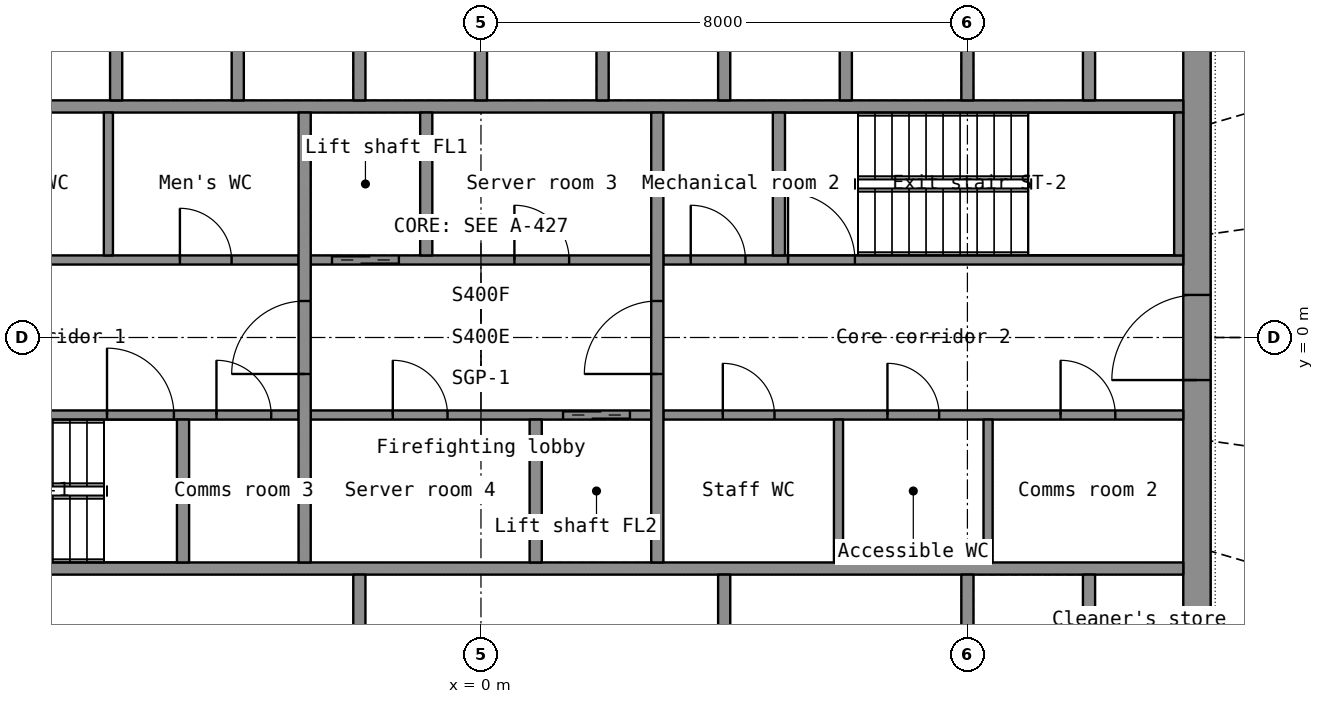
"""IFC4 building model, lengths in metres.
Left out: names, types, materials, properties, quantities, classifications, styles, units other than length and angle.
Written with IfcOpenShell. Run it as: python <this file> out.ifc"""

import sys

from ifc_helpers import new_model, si_unit, direction, frame, frame_2d, origin, place, context, subcontext, project, spatial, rectangle, extrude, element, fill, save


model = new_model("IFC4")
c1 = context("Model", 3, precision=1e-05, world=origin(), true_north=direction((0.0, 1.0)))
c2 = subcontext(c1, "Body", "Model", "MODEL_VIEW")
j1 = project(units=[si_unit("LENGTHUNIT", "METRE"), si_unit("PLANEANGLEUNIT", "RADIAN")], contexts=[c1])
p1 = place(None, origin())
s1 = spatial("IfcSite", under=j1, at=p1, CompositionType="ELEMENT")
p2 = place(p1, origin())
s2 = spatial("IfcBuilding", under=s1, at=p2, CompositionType="ELEMENT")
p3 = place(p2, frame((0.0, 0.0, 205.2)))
s3 = spatial("IfcBuildingStorey", under=s2, at=p3, CompositionType="ELEMENT", Elevation=205.2)
p4 = place(p3, frame((11.775, -7.2, 0.0), z_axis=(0.0, 0.0, 1.0), x_axis=(0.0, 1.0, 0.0)))
e1 = element("IfcWall", 1, at=p4, inside=s3, PredefinedType="SHEAR", context=c2, shape_type="SweptSolid", body=[
    extrude(rectangle(XDim=14.4, YDim=0.45, at=frame_2d((7.2, 0.0))), origin(), (0.0, 0.0, 1.0), 7.0),
])
p5 = place(p4, frame((6.5, 0.0, 0.0)))
e2 = element("IfcOpeningElement", 2, at=p5, cuts=e1, PredefinedType="OPENING", context=c2, shape_type="SweptSolid", body=[
    extrude(rectangle(XDim=1.4, YDim=2.2, at=frame_2d((0.7, 1.1))), frame((0.0, 0.235, 0.0), z_axis=(0.0, -1.0, 0.0), x_axis=(1.0, 0.0, 0.0)), (0.0, 0.0, 1.0), 0.47),
])
for number, where, z_axis, x_axis in (
    (3, (-11.55, -3.8, 0.0), (0.0, 0.0, 1.0), (1.0, 0.0, 0.0)),
    (4, (-11.55, 3.8, 0.0), (0.0, 0.0, 1.0), (1.0, 0.0, 0.0)),
):
    element("IfcWall", number, at=place(p3, frame(where, z_axis=z_axis, x_axis=x_axis)), inside=s3, PredefinedType="SHEAR", context=c2, shape_type="SweptSolid", body=[
        extrude(rectangle(XDim=23.1, YDim=0.2, at=frame_2d((11.55, 0.0))), origin(), (0.0, 0.0, 1.0), 7.0),
    ])
for number, where, z_axis, x_axis in (
    (5, (8.0, -6.75, 0.0), (0.0, 0.0, 1.0), (0.0, 1.0, 0.0)),
    (6, (10.0, -6.75, 0.0), (0.0, 0.0, 1.0), (0.0, 1.0, 0.0)),
):
    element("IfcWall", number, at=place(p3, frame(where, z_axis=z_axis, x_axis=x_axis)), inside=s3, PredefinedType="SHEAR", context=c2, shape_type="SweptSolid", body=[
        extrude(rectangle(XDim=2.85, YDim=0.2, at=frame_2d((1.425, 0.0))), origin(), (0.0, 0.0, 1.0), 7.0),
    ])
for number, where, z_axis, x_axis in (
    (7, (-2.0, -6.75, 0.0), (0.0, 0.0, 1.0), (0.0, 1.0, 0.0)),
    (8, (4.0, -6.75, 0.0), (0.0, 0.0, 1.0), (0.0, 1.0, 0.0)),
):
    element("IfcWall", number, at=place(p3, frame(where, z_axis=z_axis, x_axis=x_axis)), inside=s3, PredefinedType="PARTITIONING", context=c2, shape_type="SweptSolid", body=[
        extrude(rectangle(XDim=2.85, YDim=0.2, at=frame_2d((1.425, 0.0))), origin(), (0.0, 0.0, 1.0), 7.0),
    ])
for number, where, z_axis, x_axis in (
    (9, (-6.0, 3.9, 0.0), (0.0, 0.0, 1.0), (0.0, 1.0, 0.0)),
    (10, (-4.0, 3.9, 0.0), (0.0, 0.0, 1.0), (0.0, 1.0, 0.0)),
    (11, (-2.0, 3.9, 0.0), (0.0, 0.0, 1.0), (0.0, 1.0, 0.0)),
    (12, (0.0, 3.9, 0.0), (0.0, 0.0, 1.0), (0.0, 1.0, 0.0)),
    (13, (2.0, 3.9, 0.0), (0.0, 0.0, 1.0), (0.0, 1.0, 0.0)),
    (14, (4.0, 3.9, 0.0), (0.0, 0.0, 1.0), (0.0, 1.0, 0.0)),
    (15, (6.0, 3.9, 0.0), (0.0, 0.0, 1.0), (0.0, 1.0, 0.0)),
    (16, (8.0, 3.9, 0.0), (0.0, 0.0, 1.0), (0.0, 1.0, 0.0)),
    (17, (10.0, 3.9, 0.0), (0.0, 0.0, 1.0), (0.0, 1.0, 0.0)),
):
    element("IfcWall", number, at=place(p3, frame(where, z_axis=z_axis, x_axis=x_axis)), inside=s3, PredefinedType="SHEAR", context=c2, shape_type="SweptSolid", body=[
        extrude(rectangle(XDim=2.85, YDim=0.2, at=frame_2d((1.425, 0.0))), origin(), (0.0, 0.0, 1.0), 7.0),
    ])
p6 = place(p3, frame((-11.55, -1.275, 0.0), z_axis=(0.0, 0.0, 1.0), x_axis=(1.0, 0.0, 0.0)))
e18 = element("IfcWall", 18, at=p6, inside=s3, PredefinedType="SHEAR", context=c2, shape_type="SweptSolid", body=[
    extrude(rectangle(XDim=8.55, YDim=0.15, at=frame_2d((4.275, 0.0))), origin(), (0.0, 0.0, 1.0), 7.0),
])
p7 = place(p6, frame((5.4, 0.0, 0.0)))
e19 = element("IfcOpeningElement", 19, at=p7, cuts=e18, PredefinedType="OPENING", context=c2, shape_type="SweptSolid", body=[
    extrude(rectangle(XDim=1.1, YDim=2.15, at=frame_2d((0.55, 1.075))), frame((0.0, 0.085, 0.0), z_axis=(0.0, -1.0, 0.0), x_axis=(1.0, 0.0, 0.0)), (0.0, 0.0, 1.0), 0.17),
])
p8 = place(p6, frame((7.2, 0.0, 0.0)))
e20 = element("IfcOpeningElement", 20, at=p8, cuts=e18, PredefinedType="OPENING", context=c2, shape_type="SweptSolid", body=[
    extrude(rectangle(XDim=0.9, YDim=2.1, at=frame_2d((0.45, 1.05))), frame((0.0, 0.085, 0.0), z_axis=(0.0, -1.0, 0.0), x_axis=(1.0, 0.0, 0.0)), (0.0, 0.0, 1.0), 0.17),
])
p9 = place(p3, frame((-2.8, -1.275, 0.0), z_axis=(0.0, 0.0, 1.0), x_axis=(1.0, 0.0, 0.0)))
e21 = element("IfcWall", 21, at=p9, inside=s3, PredefinedType="SHEAR", context=c2, shape_type="SweptSolid", body=[
    extrude(rectangle(XDim=5.6, YDim=0.15, at=frame_2d((2.8, 0.0))), origin(), (0.0, 0.0, 1.0), 7.0),
])
p10 = place(p9, frame((4.15, 0.0, 0.0)))
e22 = element("IfcOpeningElement", 22, at=p10, cuts=e21, PredefinedType="OPENING", context=c2, shape_type="SweptSolid", body=[
    extrude(rectangle(XDim=1.1, YDim=2.2, at=frame_2d((0.55, 1.1))), frame((0.0, 0.085, 0.0), z_axis=(0.0, -1.0, 0.0), x_axis=(1.0, 0.0, 0.0)), (0.0, 0.0, 1.0), 0.17),
])
p11 = place(p9, frame((1.35, 0.0, 0.0)))
e23 = element("IfcOpeningElement", 23, at=p11, cuts=e21, PredefinedType="OPENING", context=c2, shape_type="SweptSolid", body=[
    extrude(rectangle(XDim=0.9, YDim=2.1, at=frame_2d((0.45, 1.05))), frame((0.0, 0.085, 0.0), z_axis=(0.0, -1.0, 0.0), x_axis=(1.0, 0.0, 0.0)), (0.0, 0.0, 1.0), 0.17),
])
p12 = place(p3, frame((3.0, -1.275, 0.0), z_axis=(0.0, 0.0, 1.0), x_axis=(1.0, 0.0, 0.0)))
e24 = element("IfcWall", 24, at=p12, inside=s3, PredefinedType="PARTITIONING", context=c2, shape_type="SweptSolid", body=[
    extrude(rectangle(XDim=8.55, YDim=0.15, at=frame_2d((4.275, 0.0))), origin(), (0.0, 0.0, 1.0), 7.0),
])
p13 = place(p12, frame((0.978, 0.0, 0.0)))
e25 = element("IfcOpeningElement", 25, at=p13, cuts=e24, PredefinedType="OPENING", context=c2, shape_type="SweptSolid", body=[
    extrude(rectangle(XDim=0.85, YDim=2.1, at=frame_2d((0.425, 1.05))), frame((0.0, 0.085, 0.0), z_axis=(0.0, -1.0, 0.0), x_axis=(1.0, 0.0, 0.0)), (0.0, 0.0, 1.0), 0.17),
])
p14 = place(p12, frame((3.685, 0.0, 0.0)))
e26 = element("IfcOpeningElement", 26, at=p14, cuts=e24, PredefinedType="OPENING", context=c2, shape_type="SweptSolid", body=[
    extrude(rectangle(XDim=0.85, YDim=2.1, at=frame_2d((0.425, 1.05))), frame((0.0, 0.085, 0.0), z_axis=(0.0, -1.0, 0.0), x_axis=(1.0, 0.0, 0.0)), (0.0, 0.0, 1.0), 0.17),
])
p15 = place(p12, frame((6.532, 0.0, 0.0)))
e27 = element("IfcOpeningElement", 27, at=p15, cuts=e24, PredefinedType="OPENING", context=c2, shape_type="SweptSolid", body=[
    extrude(rectangle(XDim=0.9, YDim=2.1, at=frame_2d((0.45, 1.05))), frame((0.0, 0.085, 0.0), z_axis=(0.0, -1.0, 0.0), x_axis=(1.0, 0.0, 0.0)), (0.0, 0.0, 1.0), 0.17),
])
p16 = place(p3, frame((-11.55, 1.275, 0.0), z_axis=(0.0, 0.0, 1.0), x_axis=(1.0, 0.0, 0.0)))
e28 = element("IfcWall", 28, at=p16, inside=s3, PredefinedType="PARTITIONING", context=c2, shape_type="SweptSolid", body=[
    extrude(rectangle(XDim=8.55, YDim=0.15, at=frame_2d((4.275, 0.0))), origin(), (0.0, 0.0, 1.0), 7.0),
])
p17 = place(p16, frame((0.623, 0.0, 0.0)))
e29 = element("IfcOpeningElement", 29, at=p17, cuts=e28, PredefinedType="OPENING", context=c2, shape_type="SweptSolid", body=[
    extrude(rectangle(XDim=0.9, YDim=2.1, at=frame_2d((0.45, 1.05))), frame((0.0, 0.085, 0.0), z_axis=(0.0, -1.0, 0.0), x_axis=(1.0, 0.0, 0.0)), (0.0, 0.0, 1.0), 0.17),
])
p18 = place(p16, frame((3.396, 0.0, 0.0)))
e30 = element("IfcOpeningElement", 30, at=p18, cuts=e28, PredefinedType="OPENING", context=c2, shape_type="SweptSolid", body=[
    extrude(rectangle(XDim=0.85, YDim=2.1, at=frame_2d((0.425, 1.05))), frame((0.0, 0.085, 0.0), z_axis=(0.0, -1.0, 0.0), x_axis=(1.0, 0.0, 0.0)), (0.0, 0.0, 1.0), 0.17),
])
p19 = place(p16, frame((6.599, 0.0, 0.0)))
e31 = element("IfcOpeningElement", 31, at=p19, cuts=e28, PredefinedType="OPENING", context=c2, shape_type="SweptSolid", body=[
    extrude(rectangle(XDim=0.85, YDim=2.1, at=frame_2d((0.425, 1.05))), frame((0.0, 0.085, 0.0), z_axis=(0.0, -1.0, 0.0), x_axis=(1.0, 0.0, 0.0)), (0.0, 0.0, 1.0), 0.17),
])
p20 = place(p3, frame((-2.8, 1.275, 0.0), z_axis=(0.0, 0.0, 1.0), x_axis=(1.0, 0.0, 0.0)))
e32 = element("IfcWall", 32, at=p20, inside=s3, PredefinedType="SHEAR", context=c2, shape_type="SweptSolid", body=[
    extrude(rectangle(XDim=5.6, YDim=0.15, at=frame_2d((2.8, 0.0))), origin(), (0.0, 0.0, 1.0), 7.0),
])
p21 = place(p20, frame((0.35, 0.0, 0.0)))
e33 = element("IfcOpeningElement", 33, at=p21, cuts=e32, PredefinedType="OPENING", context=c2, shape_type="SweptSolid", body=[
    extrude(rectangle(XDim=1.1, YDim=2.2, at=frame_2d((0.55, 1.1))), frame((0.0, 0.085, 0.0), z_axis=(0.0, -1.0, 0.0), x_axis=(1.0, 0.0, 0.0)), (0.0, 0.0, 1.0), 0.17),
])
p22 = place(p20, frame((3.35, 0.0, 0.0)))
e34 = element("IfcOpeningElement", 34, at=p22, cuts=e32, PredefinedType="OPENING", context=c2, shape_type="SweptSolid", body=[
    extrude(rectangle(XDim=0.9, YDim=2.1, at=frame_2d((0.45, 1.05))), frame((0.0, 0.085, 0.0), z_axis=(0.0, -1.0, 0.0), x_axis=(1.0, 0.0, 0.0)), (0.0, 0.0, 1.0), 0.17),
])
p23 = place(p3, frame((3.0, 1.275, 0.0), z_axis=(0.0, 0.0, 1.0), x_axis=(1.0, 0.0, 0.0)))
e35 = element("IfcWall", 35, at=p23, inside=s3, PredefinedType="SHEAR", context=c2, shape_type="SweptSolid", body=[
    extrude(rectangle(XDim=8.55, YDim=0.15, at=frame_2d((4.275, 0.0))), origin(), (0.0, 0.0, 1.0), 7.0),
])
p24 = place(p23, frame((2.05, 0.0, 0.0)))
e36 = element("IfcOpeningElement", 36, at=p24, cuts=e35, PredefinedType="OPENING", context=c2, shape_type="SweptSolid", body=[
    extrude(rectangle(XDim=1.1, YDim=2.15, at=frame_2d((0.55, 1.075))), frame((0.0, 0.085, 0.0), z_axis=(0.0, -1.0, 0.0), x_axis=(1.0, 0.0, 0.0)), (0.0, 0.0, 1.0), 0.17),
])
p25 = place(p23, frame((0.45, 0.0, 0.0)))
e37 = element("IfcOpeningElement", 37, at=p25, cuts=e35, PredefinedType="OPENING", context=c2, shape_type="SweptSolid", body=[
    extrude(rectangle(XDim=0.9, YDim=2.1, at=frame_2d((0.45, 1.05))), frame((0.0, 0.085, 0.0), z_axis=(0.0, -1.0, 0.0), x_axis=(1.0, 0.0, 0.0)), (0.0, 0.0, 1.0), 0.17),
])
p26 = place(p3, frame((-2.9, -3.7, 0.0), z_axis=(0.0, 0.0, 1.0), x_axis=(0.0, 1.0, 0.0)))
e38 = element("IfcWall", 38, at=p26, inside=s3, PredefinedType="SHEAR", context=c2, shape_type="SweptSolid", body=[
    extrude(rectangle(XDim=7.4, YDim=0.2, at=frame_2d((3.7, 0.0))), origin(), (0.0, 0.0, 1.0), 7.0),
])
p27 = place(p26, frame((3.1, 0.0, 0.0)))
e39 = element("IfcOpeningElement", 39, at=p27, cuts=e38, PredefinedType="OPENING", context=c2, shape_type="SweptSolid", body=[
    extrude(rectangle(XDim=1.2, YDim=2.2, at=frame_2d((0.6, 1.1))), frame((0.0, 0.11, 0.0), z_axis=(0.0, -1.0, 0.0), x_axis=(1.0, 0.0, 0.0)), (0.0, 0.0, 1.0), 0.22),
])
p28 = place(p3, frame((2.9, -3.7, 0.0), z_axis=(0.0, 0.0, 1.0), x_axis=(0.0, 1.0, 0.0)))
e40 = element("IfcWall", 40, at=p28, inside=s3, PredefinedType="SHEAR", context=c2, shape_type="SweptSolid", body=[
    extrude(rectangle(XDim=7.4, YDim=0.2, at=frame_2d((3.7, 0.0))), origin(), (0.0, 0.0, 1.0), 7.0),
])
p29 = place(p28, frame((3.1, 0.0, 0.0)))
e41 = element("IfcOpeningElement", 41, at=p29, cuts=e40, PredefinedType="OPENING", context=c2, shape_type="SweptSolid", body=[
    extrude(rectangle(XDim=1.2, YDim=2.2, at=frame_2d((0.6, 1.1))), frame((0.0, 0.11, 0.0), z_axis=(0.0, -1.0, 0.0), x_axis=(1.0, 0.0, 0.0)), (0.0, 0.0, 1.0), 0.22),
])
for number, where, z_axis, x_axis in (
    (42, (-0.9, 1.35, 0.0), (0.0, 0.0, 1.0), (0.0, 1.0, 0.0)),
    (43, (0.9, -3.7, 0.0), (0.0, 0.0, 1.0), (0.0, 1.0, 0.0)),
):
    element("IfcWall", number, at=place(p3, frame(where, z_axis=z_axis, x_axis=x_axis)), inside=s3, PredefinedType="SHEAR", context=c2, shape_type="SweptSolid", body=[
        extrude(rectangle(XDim=2.35, YDim=0.2, at=frame_2d((1.175, 0.0))), origin(), (0.0, 0.0, 1.0), 7.0),
    ])
p30 = place(p3, frame((11.475, 1.35, 0.0), z_axis=(0.0, 0.0, 1.0), x_axis=(0.0, 1.0, 0.0)))
e44 = element("IfcWall", 44, at=p30, inside=s3, PredefinedType="SHEAR", context=c2, shape_type="SweptSolid", body=[
    extrude(rectangle(XDim=2.35, YDim=0.15, at=frame_2d((1.175, 0.0))), origin(), (0.0, 0.0, 1.0), 7.0),
])
for number, where, z_axis, x_axis in (
    (45, (-4.9, -3.7, 0.0), (0.0, 0.0, 1.0), (0.0, 1.0, 0.0)),
    (46, (4.9, 1.35, 0.0), (0.0, 0.0, 1.0), (0.0, 1.0, 0.0)),
):
    element("IfcWall", number, at=place(p3, frame(where, z_axis=z_axis, x_axis=x_axis)), inside=s3, PredefinedType="SHEAR", context=c2, shape_type="SweptSolid", body=[
        extrude(rectangle(XDim=2.35, YDim=0.2, at=frame_2d((1.175, 0.0))), origin(), (0.0, 0.0, 1.0), 7.0),
    ])
for number, where, z_axis, x_axis in (
    (47, (-6.127, 1.35, 0.0), (0.0, 0.0, 1.0), (0.0, 1.0, 0.0)),
    (48, (5.88, -3.7, 0.0), (0.0, 0.0, 1.0), (0.0, 1.0, 0.0)),
    (49, (8.34, -3.7, 0.0), (0.0, 0.0, 1.0), (0.0, 1.0, 0.0)),
):
    element("IfcWall", number, at=place(p3, frame(where, z_axis=z_axis, x_axis=x_axis)), inside=s3, PredefinedType="PARTITIONING", context=c2, shape_type="SweptSolid", body=[
        extrude(rectangle(XDim=2.35, YDim=0.15, at=frame_2d((1.175, 0.0))), origin(), (0.0, 0.0, 1.0), 7.0),
    ])
p31 = place(p5, origin())
e50 = element("IfcDoor", 50, at=p31, inside=s3, OperationType="DOUBLE_DOOR_SINGLE_SWING", PredefinedType="DOOR", context=c2, shape_type="SweptSolid", body=[
    extrude(rectangle(XDim=1.4, YDim=2.2, at=frame_2d((0.7, 1.1))), frame((0.0, 0.025, 0.0), z_axis=(0.0, -1.0, 0.0), x_axis=(1.0, 0.0, 0.0)), (0.0, 0.0, 1.0), 0.05),
])
fill(e2, e50)
p32 = place(p27, origin())
e51 = element("IfcDoor", 51, at=p32, inside=s3, OperationType="SINGLE_SWING_LEFT", PredefinedType="DOOR", context=c2, shape_type="SweptSolid", body=[
    extrude(rectangle(XDim=1.2, YDim=2.2, at=frame_2d((0.6, 1.1))), frame((0.0, 0.025, 0.0), z_axis=(0.0, -1.0, 0.0), x_axis=(1.0, 0.0, 0.0)), (0.0, 0.0, 1.0), 0.05),
])
fill(e39, e51)
p33 = place(p29, origin())
e52 = element("IfcDoor", 52, at=p33, inside=s3, OperationType="SINGLE_SWING_LEFT", PredefinedType="DOOR", context=c2, shape_type="SweptSolid", body=[
    extrude(rectangle(XDim=1.2, YDim=2.2, at=frame_2d((0.6, 1.1))), frame((0.0, 0.025, 0.0), z_axis=(0.0, -1.0, 0.0), x_axis=(1.0, 0.0, 0.0)), (0.0, 0.0, 1.0), 0.05),
])
fill(e41, e52)
p34 = place(p21, origin())
e53 = element("IfcDoor", 53, at=p34, inside=s3, OperationType="DOUBLE_DOOR_SLIDING", PredefinedType="DOOR", context=c2, shape_type="SweptSolid", body=[
    extrude(rectangle(XDim=1.1, YDim=2.2, at=frame_2d((0.55, 1.1))), frame((0.0, 0.025, 0.0), z_axis=(0.0, -1.0, 0.0), x_axis=(1.0, 0.0, 0.0)), (0.0, 0.0, 1.0), 0.05),
])
fill(e33, e53)
p35 = place(p10, origin())
e54 = element("IfcDoor", 54, at=p35, inside=s3, OperationType="DOUBLE_DOOR_SLIDING", PredefinedType="DOOR", context=c2, shape_type="SweptSolid", body=[
    extrude(rectangle(XDim=1.1, YDim=2.2, at=frame_2d((0.55, 1.1))), frame((0.0, 0.025, 0.0), z_axis=(0.0, -1.0, 0.0), x_axis=(1.0, 0.0, 0.0)), (0.0, 0.0, 1.0), 0.05),
])
fill(e22, e54)
p36 = place(p7, origin())
e55 = element("IfcDoor", 55, at=p36, inside=s3, OperationType="SINGLE_SWING_LEFT", PredefinedType="DOOR", context=c2, shape_type="SweptSolid", body=[
    extrude(rectangle(XDim=1.1, YDim=2.15, at=frame_2d((0.55, 1.075))), frame((0.0, 0.025, 0.0), z_axis=(0.0, -1.0, 0.0), x_axis=(1.0, 0.0, 0.0)), (0.0, 0.0, 1.0), 0.05),
])
fill(e19, e55)
p37 = place(p24, origin())
e56 = element("IfcDoor", 56, at=p37, inside=s3, OperationType="SINGLE_SWING_LEFT", PredefinedType="DOOR", context=c2, shape_type="SweptSolid", body=[
    extrude(rectangle(XDim=1.1, YDim=2.15, at=frame_2d((0.55, 1.075))), frame((0.0, 0.025, 0.0), z_axis=(0.0, -1.0, 0.0), x_axis=(1.0, 0.0, 0.0)), (0.0, 0.0, 1.0), 0.05),
])
fill(e36, e56)
p38 = place(p19, origin())
e57 = element("IfcDoor", 57, at=p38, inside=s3, OperationType="SINGLE_SWING_LEFT", PredefinedType="DOOR", context=c2, shape_type="SweptSolid", body=[
    extrude(rectangle(XDim=0.85, YDim=2.1, at=frame_2d((0.425, 1.05))), frame((0.0, 0.025, 0.0), z_axis=(0.0, -1.0, 0.0), x_axis=(1.0, 0.0, 0.0)), (0.0, 0.0, 1.0), 0.05),
])
fill(e31, e57)
p39 = place(p13, origin())
e58 = element("IfcDoor", 58, at=p39, inside=s3, OperationType="SINGLE_SWING_LEFT", PredefinedType="DOOR", context=c2, shape_type="SweptSolid", body=[
    extrude(rectangle(XDim=0.85, YDim=2.1, at=frame_2d((0.425, 1.05))), frame((0.0, 0.025, 0.0), z_axis=(0.0, -1.0, 0.0), x_axis=(1.0, 0.0, 0.0)), (0.0, 0.0, 1.0), 0.05),
])
fill(e25, e58)
p40 = place(p14, origin())
e59 = element("IfcDoor", 59, at=p40, inside=s3, OperationType="SINGLE_SWING_LEFT", PredefinedType="DOOR", context=c2, shape_type="SweptSolid", body=[
    extrude(rectangle(XDim=0.85, YDim=2.1, at=frame_2d((0.425, 1.05))), frame((0.0, 0.025, 0.0), z_axis=(0.0, -1.0, 0.0), x_axis=(1.0, 0.0, 0.0)), (0.0, 0.0, 1.0), 0.05),
])
fill(e26, e59)
p41 = place(p15, origin())
e60 = element("IfcDoor", 60, at=p41, inside=s3, OperationType="SINGLE_SWING_LEFT", PredefinedType="DOOR", context=c2, shape_type="SweptSolid", body=[
    extrude(rectangle(XDim=0.9, YDim=2.1, at=frame_2d((0.45, 1.05))), frame((0.0, 0.025, 0.0), z_axis=(0.0, -1.0, 0.0), x_axis=(1.0, 0.0, 0.0)), (0.0, 0.0, 1.0), 0.05),
])
fill(e27, e60)
p42 = place(p22, origin())
e61 = element("IfcDoor", 61, at=p42, inside=s3, OperationType="SINGLE_SWING_LEFT", PredefinedType="DOOR", context=c2, shape_type="SweptSolid", body=[
    extrude(rectangle(XDim=0.9, YDim=2.1, at=frame_2d((0.45, 1.05))), frame((0.0, 0.025, 0.0), z_axis=(0.0, -1.0, 0.0), x_axis=(1.0, 0.0, 0.0)), (0.0, 0.0, 1.0), 0.05),
])
fill(e34, e61)
p43 = place(p11, origin())
e62 = element("IfcDoor", 62, at=p43, inside=s3, OperationType="SINGLE_SWING_LEFT", PredefinedType="DOOR", context=c2, shape_type="SweptSolid", body=[
    extrude(rectangle(XDim=0.9, YDim=2.1, at=frame_2d((0.45, 1.05))), frame((0.0, 0.025, 0.0), z_axis=(0.0, -1.0, 0.0), x_axis=(1.0, 0.0, 0.0)), (0.0, 0.0, 1.0), 0.05),
])
fill(e23, e62)
p44 = place(p25, origin())
e63 = element("IfcDoor", 63, at=p44, inside=s3, OperationType="SINGLE_SWING_LEFT", PredefinedType="DOOR", context=c2, shape_type="SweptSolid", body=[
    extrude(rectangle(XDim=0.9, YDim=2.1, at=frame_2d((0.45, 1.05))), frame((0.0, 0.025, 0.0), z_axis=(0.0, -1.0, 0.0), x_axis=(1.0, 0.0, 0.0)), (0.0, 0.0, 1.0), 0.05),
])
fill(e37, e63)
p45 = place(p8, origin())
e64 = element("IfcDoor", 64, at=p45, inside=s3, OperationType="SINGLE_SWING_LEFT", PredefinedType="DOOR", context=c2, shape_type="SweptSolid", body=[
    extrude(rectangle(XDim=0.9, YDim=2.1, at=frame_2d((0.45, 1.05))), frame((0.0, 0.025, 0.0), z_axis=(0.0, -1.0, 0.0), x_axis=(1.0, 0.0, 0.0)), (0.0, 0.0, 1.0), 0.05),
])
fill(e20, e64)
save(model, sys.argv[1])
